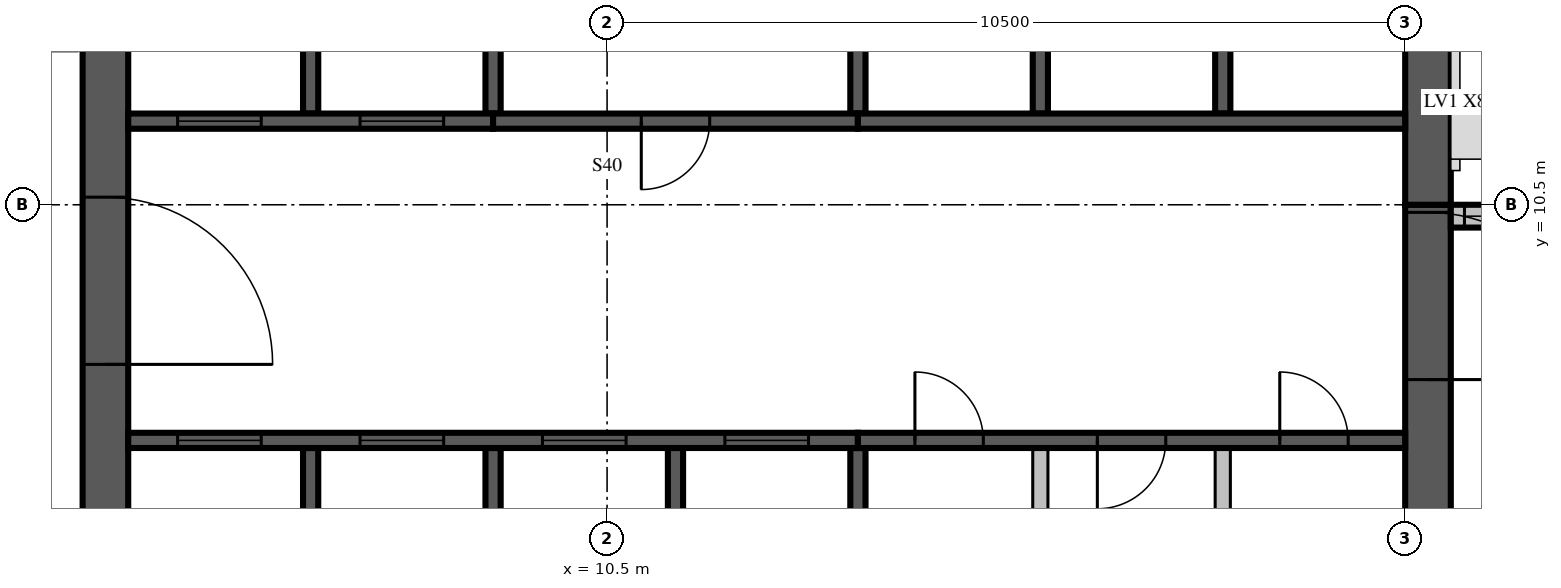
"""IFC4 building model, lengths in metres.
Left out: names, types, materials, properties, quantities, classifications, styles, units other than length and angle.
Written with IfcOpenShell. Run it as: python <this file> out.ifc"""

import sys

from ifc_helpers import new_model, si_unit, direction, frame, frame_2d, origin, place, context, subcontext, project, spatial, rectangle, extrude, source, transform, mapped, element, fill, save


model = new_model("IFC4")
c1 = context("Model", 3, precision=1e-05, world=origin(), true_north=direction((0.0, 1.0)))
c2 = subcontext(c1, "Body", "Model", "MODEL_VIEW")
j1 = project(units=[si_unit("LENGTHUNIT", "METRE"), si_unit("PLANEANGLEUNIT", "RADIAN")], contexts=[c1])
p1 = place(None, origin())
s1 = spatial("IfcSite", under=j1, at=p1, CompositionType="ELEMENT")
p2 = place(p1, origin())
s2 = spatial("IfcBuilding", under=s1, at=p2, CompositionType="ELEMENT")
p3 = place(p2, frame((0.0, 0.0, 288.0)))
s3 = spatial("IfcBuildingStorey", under=s2, at=p3, CompositionType="ELEMENT", Elevation=288.0)
m1 = source(origin(), c2, "Body", "SweptSolid", [
    extrude(rectangle(XDim=17.4, YDim=0.6, at=frame_2d((8.7, 0.0))), origin(), (0.0, 0.0, 1.0), 3.5),
])
p4 = place(p3, frame((3.9, 4.2, 0.0), z_axis=(0.0, 0.0, 1.0), x_axis=(0.0, 1.0, 0.0)))
e1 = element("IfcWall", 1, at=p4, inside=s3, PredefinedType="SHEAR", context=c2, shape_type="MappedRepresentation", body=[
    mapped(m1, transform((0.0, 0.0, 0.0), scale=1.0)),
])
m2 = source(origin(), c2, "Body", "SweptSolid", [
    extrude(rectangle(XDim=2.2, YDim=2.1, at=frame_2d((1.1, 1.05))), frame((0.0, 0.31, 0.0), z_axis=(0.0, -1.0, 0.0), x_axis=(1.0, 0.0, 0.0)), (0.0, 0.0, 1.0), 0.62),
])
p5 = place(p4, frame((4.2, 0.0, 0.0)))
e2 = element("IfcOpeningElement", 2, at=p5, cuts=e1, PredefinedType="OPENING", context=c2, shape_type="MappedRepresentation", body=[
    mapped(m2, transform((0.0, 0.0, 0.0), scale=1.0)),
])
m3 = source(origin(), c2, "Body", "SweptSolid", [
    extrude(rectangle(XDim=6.3, YDim=0.6, at=frame_2d((3.15, 0.0))), origin(), (0.0, 0.0, 1.0), 3.5),
])
p6 = place(p3, frame((21.3, 4.2, 0.0), z_axis=(0.0, 0.0, 1.0), x_axis=(0.0, 1.0, 0.0)))
e3 = element("IfcWall", 3, at=p6, inside=s3, PredefinedType="SHEAR", context=c2, shape_type="MappedRepresentation", body=[
    mapped(m3, transform((0.0, 0.0, 0.0), scale=1.0)),
])
p7 = place(p6, frame((4.0, 0.0, 0.0)))
e4 = element("IfcOpeningElement", 4, at=p7, cuts=e3, PredefinedType="OPENING", context=c2, shape_type="MappedRepresentation", body=[
    mapped(m2, transform((0.0, 0.0, 0.0), scale=1.0)),
])
m4 = source(origin(), c2, "Body", "SweptSolid", [
    extrude(rectangle(XDim=10.5, YDim=0.6, at=frame_2d((5.25, 0.0))), origin(), (0.0, 0.0, 1.0), 3.5),
])
p8 = place(p3, frame((21.3, 10.5, 0.0), z_axis=(0.0, 0.0, 1.0), x_axis=(0.0, 1.0, 0.0)))
e5 = element("IfcWall", 5, at=p8, inside=s3, PredefinedType="SHEAR", context=c2, shape_type="MappedRepresentation", body=[
    mapped(m4, transform((0.0, 0.0, 0.0), scale=1.0)),
])
m5 = source(origin(), c2, "Body", "SweptSolid", [
    extrude(rectangle(XDim=1.2, YDim=2.4, at=frame_2d((0.6, 1.2))), frame((0.0, 0.31, 0.0), z_axis=(0.0, -1.0, 0.0), x_axis=(1.0, 0.0, 0.0)), (0.0, 0.0, 1.0), 0.62),
])
p9 = place(p8, frame((5.7, 0.0, 0.6)))
e6 = element("IfcOpeningElement", 6, at=p9, cuts=e5, PredefinedType="OPENING", context=c2, shape_type="MappedRepresentation", body=[
    mapped(m5, transform((0.0, 0.0, 0.0), scale=1.0)),
])
m6 = source(origin(), c2, "Body", "SweptSolid", [
    extrude(rectangle(XDim=7.45, YDim=0.3, at=frame_2d((3.725, 0.0))), origin(), (0.0, 0.0, 1.0), 3.1),
])
p10 = place(p3, frame((29.05, 10.35, 0.0), z_axis=(0.0, 0.0, 1.0), x_axis=(-1.0, 0.0, 0.0)))
e7 = element("IfcWall", 7, at=p10, inside=s3, PredefinedType="STANDARD", context=c2, shape_type="MappedRepresentation", body=[
    mapped(m6, transform((0.0, 0.0, 0.0), scale=1.0)),
])
m7 = source(origin(), c2, "Body", "SweptSolid", [
    extrude(rectangle(XDim=3.0, YDim=2.0, at=frame_2d((1.5, 1.0))), frame((0.0, 0.16, 0.0), z_axis=(0.0, -1.0, 0.0), x_axis=(1.0, 0.0, 0.0)), (0.0, 0.0, 1.0), 0.32),
])
p11 = place(p10, frame((1.09, 0.0, 0.6)))
e8 = element("IfcOpeningElement", 8, at=p11, cuts=e7, PredefinedType="OPENING", context=c2, shape_type="MappedRepresentation", body=[
    mapped(m7, transform((0.0, 0.0, 0.0), scale=1.0)),
])
m8 = source(origin(), c2, "Body", "SweptSolid", [
    extrude(rectangle(XDim=1.8, YDim=2.0, at=frame_2d((0.9, 1.0))), frame((0.0, 0.16, 0.0), z_axis=(0.0, -1.0, 0.0), x_axis=(1.0, 0.0, 0.0)), (0.0, 0.0, 1.0), 0.32),
])
p12 = place(p10, frame((5.47, 0.0, 0.6)))
e9 = element("IfcOpeningElement", 9, at=p12, cuts=e7, PredefinedType="OPENING", context=c2, shape_type="MappedRepresentation", body=[
    mapped(m8, transform((0.0, 0.0, 0.0), scale=1.0)),
])
m9 = source(origin(), c2, "Body", "SweptSolid", [
    extrude(rectangle(XDim=3.1, YDim=0.2, at=frame_2d((1.55, 0.0))), origin(), (0.0, 0.0, 1.0), 3.5),
])
for number, where, z_axis, x_axis in (
    (10, (6.6, 4.2, 0.0), (0.0, 0.0, 1.0), (0.0, 1.0, 0.0)),
    (11, (9.0, 4.2, 0.0), (0.0, 0.0, 1.0), (0.0, 1.0, 0.0)),
    (12, (11.4, 4.2, 0.0), (0.0, 0.0, 1.0), (0.0, 1.0, 0.0)),
):
    element("IfcWall", number, at=place(p3, frame(where, z_axis=z_axis, x_axis=x_axis)), inside=s3, PredefinedType="SOLIDWALL", context=c2, shape_type="MappedRepresentation", body=[
        mapped(m9, transform((0.0, 0.0, 0.0), scale=1.0)),
    ])
m10 = source(origin(), c2, "Body", "SweptSolid", [
    extrude(rectangle(XDim=3.1, YDim=0.2, at=frame_2d((1.55, 0.0))), origin(), (0.0, 0.0, 1.0), 3.1),
])
p13 = place(p3, frame((13.8, 4.2, 0.0), z_axis=(0.0, 0.0, 1.0), x_axis=(0.0, 1.0, 0.0)))
e13 = element("IfcWall", 13, at=p13, inside=s3, PredefinedType="SOLIDWALL", context=c2, shape_type="MappedRepresentation", body=[
    mapped(m10, transform((0.0, 0.0, 0.0), scale=1.0)),
])
p14 = place(p3, frame((16.2, 4.2, 0.0), z_axis=(0.0, 0.0, 1.0), x_axis=(0.0, 1.0, 0.0)))
e14 = element("IfcWall", 14, at=p14, inside=s3, PredefinedType="PARTITIONING", context=c2, shape_type="SweptSolid", body=[
    extrude(rectangle(XDim=3.1, YDim=0.2, at=frame_2d((1.55, 0.0))), origin(), (0.0, 0.0, 1.0), 3.1),
])
m11 = source(origin(), c2, "Body", "SweptSolid", [
    extrude(rectangle(XDim=3.1, YDim=0.2, at=frame_2d((1.55, 0.0))), origin(), (0.0, 0.0, 1.0), 3.1),
])
p15 = place(p3, frame((18.6, 4.2, 0.0), z_axis=(0.0, 0.0, 1.0), x_axis=(0.0, 1.0, 0.0)))
e15 = element("IfcWall", 15, at=p15, inside=s3, PredefinedType="PARTITIONING", context=c2, shape_type="MappedRepresentation", body=[
    mapped(m11, transform((0.0, 0.0, 0.0), scale=1.0)),
])
m12 = source(origin(), c2, "Body", "SweptSolid", [
    extrude(rectangle(XDim=3.0, YDim=0.2, at=frame_2d((1.5, 0.0))), origin(), (0.0, 0.0, 1.0), 3.5),
])
p16 = place(p3, frame((6.6, 11.7, 0.0), z_axis=(0.0, 0.0, 1.0), x_axis=(0.0, 1.0, 0.0)))
e16 = element("IfcWall", 16, at=p16, inside=s3, PredefinedType="SOLIDWALL", context=c2, shape_type="MappedRepresentation", body=[
    mapped(m12, transform((0.0, 0.0, 0.0), scale=1.0)),
])
m13 = source(origin(), c2, "Body", "SweptSolid", [
    extrude(rectangle(XDim=3.0, YDim=0.2, at=frame_2d((1.5, 0.0))), origin(), (0.0, 0.0, 1.0), 3.1),
])
for number, where, z_axis, x_axis in (
    (17, (9.0, 11.7, 0.0), (0.0, 0.0, 1.0), (0.0, 1.0, 0.0)),
    (18, (13.8, 11.7, 0.0), (0.0, 0.0, 1.0), (0.0, 1.0, 0.0)),
):
    element("IfcWall", number, at=place(p3, frame(where, z_axis=z_axis, x_axis=x_axis)), inside=s3, PredefinedType="SOLIDWALL", context=c2, shape_type="MappedRepresentation", body=[
        mapped(m13, transform((0.0, 0.0, 0.0), scale=1.0)),
    ])
for number, where, z_axis, x_axis in (
    (19, (16.2, 11.7, 0.0), (0.0, 0.0, 1.0), (0.0, 1.0, 0.0)),
    (20, (18.6, 11.7, 0.0), (0.0, 0.0, 1.0), (0.0, 1.0, 0.0)),
):
    element("IfcWall", number, at=place(p3, frame(where, z_axis=z_axis, x_axis=x_axis)), inside=s3, PredefinedType="SOLIDWALL", context=c2, shape_type="MappedRepresentation", body=[
        mapped(m12, transform((0.0, 0.0, 0.0), scale=1.0)),
    ])
m14 = source(origin(), c2, "Body", "SweptSolid", [
    extrude(rectangle(XDim=9.6, YDim=0.2, at=frame_2d((4.8, 0.0))), origin(), (0.0, 0.0, 1.0), 3.5),
])
p17 = place(p3, frame((4.2, 7.4, 0.0), z_axis=(0.0, 0.0, 1.0), x_axis=(1.0, 0.0, 0.0)))
e21 = element("IfcWall", 21, at=p17, inside=s3, PredefinedType="SOLIDWALL", context=c2, shape_type="MappedRepresentation", body=[
    mapped(m14, transform((0.0, 0.0, 0.0), scale=1.0)),
])
m15 = source(origin(), c2, "Body", "SweptSolid", [
    extrude(rectangle(XDim=1.1, YDim=2.1, at=frame_2d((0.55, 1.05))), frame((0.0, 0.11, 0.0), z_axis=(0.0, -1.0, 0.0), x_axis=(1.0, 0.0, 0.0)), (0.0, 0.0, 1.0), 0.22),
])
p18 = place(p17, frame((0.65, 0.0, 0.0)))
e22 = element("IfcOpeningElement", 22, at=p18, cuts=e21, PredefinedType="OPENING", context=c2, shape_type="MappedRepresentation", body=[
    mapped(m15, transform((0.0, 0.0, 0.0), scale=1.0)),
])
p19 = place(p17, frame((3.05, 0.0, 0.0)))
e23 = element("IfcOpeningElement", 23, at=p19, cuts=e21, PredefinedType="OPENING", context=c2, shape_type="MappedRepresentation", body=[
    mapped(m15, transform((0.0, 0.0, 0.0), scale=1.0)),
])
p20 = place(p17, frame((5.45, 0.0, 0.0)))
e24 = element("IfcOpeningElement", 24, at=p20, cuts=e21, PredefinedType="OPENING", context=c2, shape_type="MappedRepresentation", body=[
    mapped(m15, transform((0.0, 0.0, 0.0), scale=1.0)),
])
p21 = place(p17, frame((7.85, 0.0, 0.0)))
e25 = element("IfcOpeningElement", 25, at=p21, cuts=e21, PredefinedType="OPENING", context=c2, shape_type="MappedRepresentation", body=[
    mapped(m15, transform((0.0, 0.0, 0.0), scale=1.0)),
])
m16 = source(origin(), c2, "Body", "SweptSolid", [
    extrude(rectangle(XDim=7.2, YDim=0.2, at=frame_2d((3.6, 0.0))), origin(), (0.0, 0.0, 1.0), 3.1),
])
p22 = place(p3, frame((13.8, 7.4, 0.0), z_axis=(0.0, 0.0, 1.0), x_axis=(1.0, 0.0, 0.0)))
e26 = element("IfcWall", 26, at=p22, inside=s3, PredefinedType="SOLIDWALL", context=c2, shape_type="MappedRepresentation", body=[
    mapped(m16, transform((0.0, 0.0, 0.0), scale=1.0)),
])
m17 = source(origin(), c2, "Body", "SweptSolid", [
    extrude(rectangle(XDim=0.9, YDim=2.1, at=frame_2d((0.45, 1.05))), frame((0.0, 0.11, 0.0), z_axis=(0.0, -1.0, 0.0), x_axis=(1.0, 0.0, 0.0)), (0.0, 0.0, 1.0), 0.22),
])
p23 = place(p22, frame((0.75, 0.0, 0.0)))
e27 = element("IfcOpeningElement", 27, at=p23, cuts=e26, PredefinedType="OPENING", context=c2, shape_type="MappedRepresentation", body=[
    mapped(m17, transform((0.0, 0.0, 0.0), scale=1.0)),
])
p24 = place(p22, frame((3.15, 0.0, 0.0)))
e28 = element("IfcOpeningElement", 28, at=p24, cuts=e26, PredefinedType="OPENING", context=c2, shape_type="MappedRepresentation", body=[
    mapped(m17, transform((0.0, 0.0, 0.0), scale=1.0)),
])
p25 = place(p22, frame((5.55, 0.0, 0.0)))
e29 = element("IfcOpeningElement", 29, at=p25, cuts=e26, PredefinedType="OPENING", context=c2, shape_type="MappedRepresentation", body=[
    mapped(m17, transform((0.0, 0.0, 0.0), scale=1.0)),
])
m18 = source(origin(), c2, "Body", "SweptSolid", [
    extrude(rectangle(XDim=4.8, YDim=0.2, at=frame_2d((2.4, 0.0))), origin(), (0.0, 0.0, 1.0), 3.5),
])
p26 = place(p3, frame((4.2, 11.6, 0.0), z_axis=(0.0, 0.0, 1.0), x_axis=(1.0, 0.0, 0.0)))
e30 = element("IfcWall", 30, at=p26, inside=s3, PredefinedType="SOLIDWALL", context=c2, shape_type="MappedRepresentation", body=[
    mapped(m18, transform((0.0, 0.0, 0.0), scale=1.0)),
])
p27 = place(p26, frame((0.65, 0.0, 0.0)))
e31 = element("IfcOpeningElement", 31, at=p27, cuts=e30, PredefinedType="OPENING", context=c2, shape_type="MappedRepresentation", body=[
    mapped(m15, transform((0.0, 0.0, 0.0), scale=1.0)),
])
p28 = place(p26, frame((3.05, 0.0, 0.0)))
e32 = element("IfcOpeningElement", 32, at=p28, cuts=e30, PredefinedType="OPENING", context=c2, shape_type="MappedRepresentation", body=[
    mapped(m15, transform((0.0, 0.0, 0.0), scale=1.0)),
])
m19 = source(origin(), c2, "Body", "SweptSolid", [
    extrude(rectangle(XDim=4.8, YDim=0.2, at=frame_2d((2.4, 0.0))), origin(), (0.0, 0.0, 1.0), 3.1),
])
p29 = place(p3, frame((9.0, 11.6, 0.0), z_axis=(0.0, 0.0, 1.0), x_axis=(1.0, 0.0, 0.0)))
e33 = element("IfcWall", 33, at=p29, inside=s3, PredefinedType="SOLIDWALL", context=c2, shape_type="MappedRepresentation", body=[
    mapped(m19, transform((0.0, 0.0, 0.0), scale=1.0)),
])
p30 = place(p29, frame((1.95, 0.0, 0.0)))
e34 = element("IfcOpeningElement", 34, at=p30, cuts=e33, PredefinedType="OPENING", context=c2, shape_type="MappedRepresentation", body=[
    mapped(m17, transform((0.0, 0.0, 0.0), scale=1.0)),
])
m20 = source(origin(), c2, "Body", "SweptSolid", [
    extrude(rectangle(XDim=7.2, YDim=0.2, at=frame_2d((3.6, 0.0))), origin(), (0.0, 0.0, 1.0), 3.5),
])
p31 = place(p3, frame((13.8, 11.6, 0.0), z_axis=(0.0, 0.0, 1.0), x_axis=(1.0, 0.0, 0.0)))
e35 = element("IfcWall", 35, at=p31, inside=s3, PredefinedType="SOLIDWALL", context=c2, shape_type="MappedRepresentation", body=[
    mapped(m20, transform((0.0, 0.0, 0.0), scale=1.0)),
])
m21 = source(origin(), c2, "Body", "SweptSolid", [
    extrude(rectangle(XDim=1.8, YDim=2.0, at=frame_2d((0.9, 1.0))), frame((0.0, 0.03, 0.0), z_axis=(0.0, -1.0, 0.0), x_axis=(1.0, 0.0, 0.0)), (0.0, 0.0, 1.0), 0.06),
])
p32 = place(p12, origin())
e36 = element("IfcWindow", 36, at=p32, inside=s3, PartitioningType="SINGLE_PANEL", PredefinedType="WINDOW", context=c2, shape_type="MappedRepresentation", body=[
    mapped(m21, transform((0.0, 0.0, 0.0), scale=1.0)),
])
fill(e9, e36)
m22 = source(origin(), c2, "Body", "SweptSolid", [
    extrude(rectangle(XDim=1.1, YDim=2.1, at=frame_2d((0.55, 1.05))), frame((0.0, 0.025, 0.0), z_axis=(0.0, -1.0, 0.0), x_axis=(1.0, 0.0, 0.0)), (0.0, 0.0, 1.0), 0.05),
])
p33 = place(p18, origin())
e37 = element("IfcDoor", 37, at=p33, inside=s3, OperationType="SLIDING_TO_LEFT", PredefinedType="DOOR", context=c2, shape_type="MappedRepresentation", body=[
    mapped(m22, transform((0.0, 0.0, 0.0), scale=1.0)),
])
fill(e22, e37)
p34 = place(p19, origin())
e38 = element("IfcDoor", 38, at=p34, inside=s3, OperationType="SLIDING_TO_LEFT", PredefinedType="DOOR", context=c2, shape_type="MappedRepresentation", body=[
    mapped(m22, transform((0.0, 0.0, 0.0), scale=1.0)),
])
fill(e23, e38)
p35 = place(p20, origin())
e39 = element("IfcDoor", 39, at=p35, inside=s3, OperationType="SLIDING_TO_LEFT", PredefinedType="DOOR", context=c2, shape_type="MappedRepresentation", body=[
    mapped(m22, transform((0.0, 0.0, 0.0), scale=1.0)),
])
fill(e24, e39)
p36 = place(p21, origin())
e40 = element("IfcDoor", 40, at=p36, inside=s3, OperationType="SLIDING_TO_LEFT", PredefinedType="DOOR", context=c2, shape_type="MappedRepresentation", body=[
    mapped(m22, transform((0.0, 0.0, 0.0), scale=1.0)),
])
fill(e25, e40)
m23 = source(origin(), c2, "Body", "SweptSolid", [
    extrude(rectangle(XDim=0.9, YDim=2.1, at=frame_2d((0.45, 1.05))), frame((0.0, 0.025, 0.0), z_axis=(0.0, -1.0, 0.0), x_axis=(1.0, 0.0, 0.0)), (0.0, 0.0, 1.0), 0.05),
])
p37 = place(p23, origin())
e41 = element("IfcDoor", 41, at=p37, inside=s3, OperationType="SINGLE_SWING_LEFT", PredefinedType="DOOR", context=c2, shape_type="MappedRepresentation", body=[
    mapped(m23, transform((0.0, 0.0, 0.0), scale=1.0)),
])
fill(e27, e41)
p38 = place(p24, origin())
e42 = element("IfcDoor", 42, at=p38, inside=s3, OperationType="SINGLE_SWING_RIGHT", PredefinedType="DOOR", context=c2, shape_type="MappedRepresentation", body=[
    mapped(m23, transform((0.0, 0.0, 0.0), scale=1.0)),
])
fill(e28, e42)
p39 = place(p25, origin())
e43 = element("IfcDoor", 43, at=p39, inside=s3, OperationType="SINGLE_SWING_LEFT", PredefinedType="DOOR", context=c2, shape_type="MappedRepresentation", body=[
    mapped(m23, transform((0.0, 0.0, 0.0), scale=1.0)),
])
fill(e29, e43)
p40 = place(p27, origin())
e44 = element("IfcDoor", 44, at=p40, inside=s3, OperationType="SLIDING_TO_LEFT", PredefinedType="DOOR", context=c2, shape_type="MappedRepresentation", body=[
    mapped(m22, transform((0.0, 0.0, 0.0), scale=1.0)),
])
fill(e31, e44)
p41 = place(p28, origin())
e45 = element("IfcDoor", 45, at=p41, inside=s3, OperationType="SLIDING_TO_LEFT", PredefinedType="DOOR", context=c2, shape_type="MappedRepresentation", body=[
    mapped(m22, transform((0.0, 0.0, 0.0), scale=1.0)),
])
fill(e32, e45)
p42 = place(p30, origin())
e46 = element("IfcDoor", 46, at=p42, inside=s3, OperationType="SINGLE_SWING_RIGHT", PredefinedType="DOOR", context=c2, shape_type="MappedRepresentation", body=[
    mapped(m23, transform((0.0, 0.0, 0.0), scale=1.0)),
])
fill(e34, e46)
m24 = source(origin(), c2, "Body", "SweptSolid", [
    extrude(rectangle(XDim=2.2, YDim=2.1, at=frame_2d((1.1, 1.05))), frame((0.0, 0.025, 0.0), z_axis=(0.0, -1.0, 0.0), x_axis=(1.0, 0.0, 0.0)), (0.0, 0.0, 1.0), 0.05),
])
p43 = place(p7, origin())
e47 = element("IfcDoor", 47, at=p43, inside=s3, OperationType="DOUBLE_DOOR_SINGLE_SWING", PredefinedType="DOOR", context=c2, shape_type="MappedRepresentation", body=[
    mapped(m24, transform((0.0, 0.0, 0.0), scale=1.0)),
])
fill(e4, e47)
p44 = place(p5, origin())
e48 = element("IfcDoor", 48, at=p44, inside=s3, OperationType="DOUBLE_DOOR_SINGLE_SWING", PredefinedType="DOOR", context=c2, shape_type="MappedRepresentation", body=[
    mapped(m24, transform((0.0, 0.0, 0.0), scale=1.0)),
])
fill(e2, e48)
save(model, sys.argv[1])
